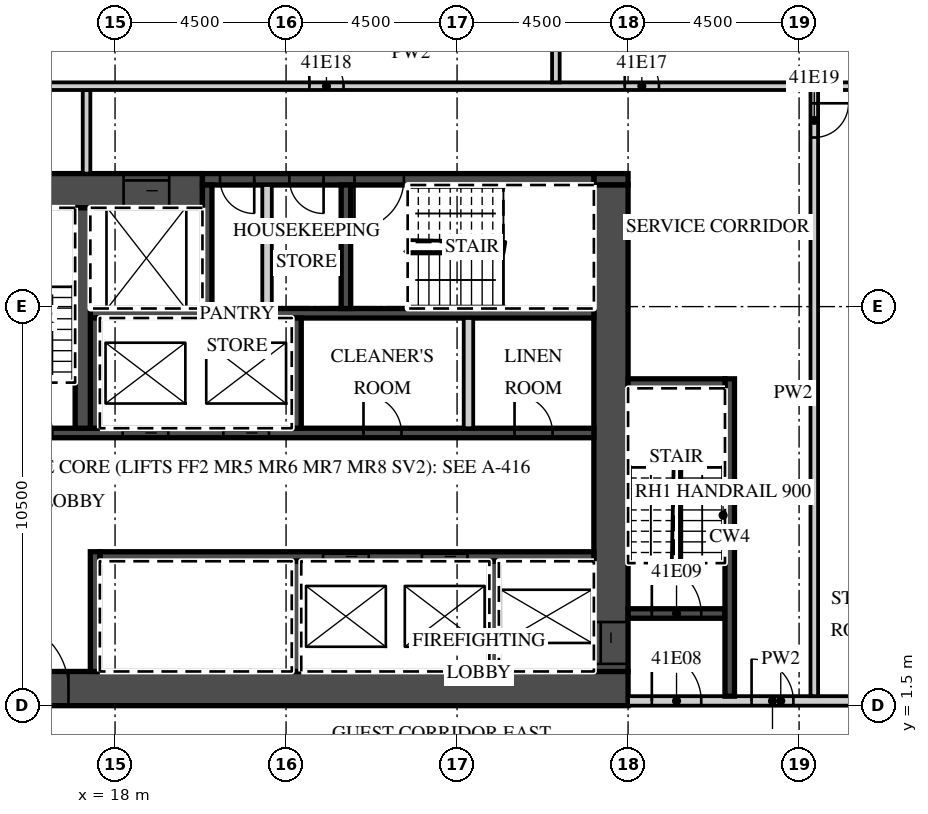
"""IFC4 building model, lengths in metres.
Left out: names, types, materials, properties, quantities, classifications, styles, units other than length and angle.
Written with IfcOpenShell. Run it as: python <this file> out.ifc"""

import sys

from ifc_helpers import new_model, si_unit, direction, frame, frame_2d, origin, place, context, subcontext, project, spatial, rectangle, extrude, element, fill, save


model = new_model("IFC4")
c1 = context("Model", 3, precision=1e-05, world=origin(), true_north=direction((0.0, 1.0)))
c2 = subcontext(c1, "Body", "Model", "MODEL_VIEW")
j1 = project(units=[si_unit("LENGTHUNIT", "METRE"), si_unit("PLANEANGLEUNIT", "RADIAN")], contexts=[c1])
p1 = place(None, origin())
s1 = spatial("IfcSite", under=j1, at=p1, CompositionType="ELEMENT")
p2 = place(p1, origin())
s2 = spatial("IfcBuilding", under=s1, at=p2, CompositionType="ELEMENT")
p3 = place(p2, frame((0.0, 0.0, 176.8)))
s3 = spatial("IfcBuildingStorey", under=s2, at=p3, CompositionType="ELEMENT", Elevation=176.8)
p4 = place(p3, frame((13.5, 1.95, 0.0), z_axis=(0.0, 0.0, 1.0), x_axis=(1.0, 0.0, 0.0)))
e1 = element("IfcWall", 1, at=p4, inside=s3, PredefinedType="SHEAR", context=c2, shape_type="SweptSolid", body=[
    extrude(rectangle(XDim=18.0, YDim=0.9, at=frame_2d((9.0, 0.0))), origin(), (0.0, 0.0, 1.0), 3.02),
])
p5 = place(p4, frame((1.475, 0.0, 0.0)))
e2 = element("IfcOpeningElement", 2, at=p5, cuts=e1, PredefinedType="OPENING", context=c2, shape_type="SweptSolid", body=[
    extrude(rectangle(XDim=1.8, YDim=2.1, at=frame_2d((0.9, 1.05))), frame((0.0, 0.46, 0.0), z_axis=(0.0, -1.0, 0.0), x_axis=(1.0, 0.0, 0.0)), (0.0, 0.0, 1.0), 0.92),
])
p6 = place(p3, frame((13.5, 15.05, 0.0), z_axis=(0.0, 0.0, 1.0), x_axis=(1.0, 0.0, 0.0)))
e3 = element("IfcWall", 3, at=p6, inside=s3, PredefinedType="SHEAR", context=c2, shape_type="SweptSolid", body=[
    extrude(rectangle(XDim=6.8, YDim=0.9, at=frame_2d((3.4, 0.0))), origin(), (0.0, 0.0, 1.0), 3.02),
])
p7 = place(p6, frame((4.725, 0.0, 0.0)))
e4 = element("IfcOpeningElement", 4, at=p7, cuts=e3, PredefinedType="OPENING", context=c2, shape_type="SweptSolid", body=[
    extrude(rectangle(XDim=1.2, YDim=2.1, at=frame_2d((0.6, 1.05))), frame((0.0, 0.46, 0.0), z_axis=(0.0, -1.0, 0.0), x_axis=(1.0, 0.0, 0.0)), (0.0, 0.0, 1.0), 0.92),
])
p8 = place(p3, frame((30.6, 15.35, 0.0), z_axis=(0.0, 0.0, 1.0), x_axis=(1.0, 0.0, 0.0)))
e5 = element("IfcWall", 5, at=p8, inside=s3, PredefinedType="SHEAR", context=c2, shape_type="SweptSolid", body=[
    extrude(rectangle(XDim=0.9, YDim=0.3, at=frame_2d((0.45, 0.0))), origin(), (0.0, 0.0, 1.0), 3.02),
])
p9 = place(p3, frame((20.3, 15.35, 0.0), z_axis=(0.0, 0.0, 1.0), x_axis=(1.0, 0.0, 0.0)))
e6 = element("IfcWall", 6, at=p9, inside=s3, PredefinedType="SHEAR", context=c2, shape_type="SweptSolid", body=[
    extrude(rectangle(XDim=10.3, YDim=0.3, at=frame_2d((5.15, 0.0))), origin(), (0.0, 0.0, 1.0), 3.02),
])
p10 = place(p9, frame((4.0, 0.0, 0.0)))
e7 = element("IfcOpeningElement", 7, at=p10, cuts=e6, PredefinedType="OPENING", context=c2, shape_type="SweptSolid", body=[
    extrude(rectangle(XDim=1.3, YDim=2.1, at=frame_2d((0.65, 1.05))), frame((0.0, 0.16, 0.0), z_axis=(0.0, -1.0, 0.0), x_axis=(1.0, 0.0, 0.0)), (0.0, 0.0, 1.0), 0.32),
])
p11 = place(p9, frame((2.288, 0.0, 0.0)))
e8 = element("IfcOpeningElement", 8, at=p11, cuts=e6, PredefinedType="OPENING", context=c2, shape_type="SweptSolid", body=[
    extrude(rectangle(XDim=0.9, YDim=2.1, at=frame_2d((0.45, 1.05))), frame((0.0, 0.16, 0.0), z_axis=(0.0, -1.0, 0.0), x_axis=(1.0, 0.0, 0.0)), (0.0, 0.0, 1.0), 0.32),
])
p12 = place(p9, frame((0.462, 0.0, 0.0)))
e9 = element("IfcOpeningElement", 9, at=p12, cuts=e6, PredefinedType="OPENING", context=c2, shape_type="SweptSolid", body=[
    extrude(rectangle(XDim=0.9, YDim=2.1, at=frame_2d((0.45, 1.05))), frame((0.0, 0.16, 0.0), z_axis=(0.0, -1.0, 0.0), x_axis=(1.0, 0.0, 0.0)), (0.0, 0.0, 1.0), 0.32),
])
p13 = place(p3, frame((31.05, 2.4, 0.0), z_axis=(0.0, 0.0, 1.0), x_axis=(0.0, 1.0, 0.0)))
e10 = element("IfcWall", 10, at=p13, inside=s3, PredefinedType="SHEAR", context=c2, shape_type="SweptSolid", body=[
    extrude(rectangle(XDim=12.8, YDim=0.9, at=frame_2d((6.4, 0.0))), origin(), (0.0, 0.0, 1.0), 3.02),
])
p14 = place(p13, frame((0.2, 0.0, 0.0)))
e11 = element("IfcOpeningElement", 11, at=p14, cuts=e10, PredefinedType="OPENING", context=c2, shape_type="SweptSolid", body=[
    extrude(rectangle(XDim=1.1, YDim=2.1, at=frame_2d((0.55, 1.05))), frame((0.0, 0.46, 0.0), z_axis=(0.0, -1.0, 0.0), x_axis=(1.0, 0.0, 0.0)), (0.0, 0.0, 1.0), 0.92),
])
p15 = place(p3, frame((17.6, 5.425, 0.0), z_axis=(0.0, 0.0, 1.0), x_axis=(1.0, 0.0, 0.0)))
e12 = element("IfcWall", 12, at=p15, inside=s3, PredefinedType="SHEAR", context=c2, shape_type="SweptSolid", body=[
    extrude(rectangle(XDim=13.0, YDim=0.25, at=frame_2d((6.5, 0.0))), origin(), (0.0, 0.0, 1.0), 3.02),
])
p16 = place(p15, frame((8.475, 0.0, 0.0)))
e13 = element("IfcOpeningElement", 13, at=p16, cuts=e12, PredefinedType="OPENING", context=c2, shape_type="SweptSolid", body=[
    extrude(rectangle(XDim=1.2, YDim=2.1, at=frame_2d((0.6, 1.05))), frame((0.0, 0.135, 0.0), z_axis=(0.0, -1.0, 0.0), x_axis=(1.0, 0.0, 0.0)), (0.0, 0.0, 1.0), 0.27),
])
p17 = place(p15, frame((5.875, 0.0, 0.0)))
e14 = element("IfcOpeningElement", 14, at=p17, cuts=e12, PredefinedType="OPENING", context=c2, shape_type="SweptSolid", body=[
    extrude(rectangle(XDim=1.2, YDim=2.1, at=frame_2d((0.6, 1.05))), frame((0.0, 0.135, 0.0), z_axis=(0.0, -1.0, 0.0), x_axis=(1.0, 0.0, 0.0)), (0.0, 0.0, 1.0), 0.27),
])
p18 = place(p3, frame((17.475, 2.4, 0.0), z_axis=(0.0, 0.0, 1.0), x_axis=(0.0, 1.0, 0.0)))
e15 = element("IfcWall", 15, at=p18, inside=s3, PredefinedType="SHEAR", context=c2, shape_type="SweptSolid", body=[
    extrude(rectangle(XDim=3.15, YDim=0.25, at=frame_2d((1.575, 0.0))), origin(), (0.0, 0.0, 1.0), 3.02),
])
for number, where, z_axis, x_axis in (
    (16, (27.975, 2.4, 0.0), (0.0, 0.0, 1.0), (0.0, 1.0, 0.0)),
    (17, (22.775, 2.4, 0.0), (0.0, 0.0, 1.0), (0.0, 1.0, 0.0)),
):
    element("IfcWall", number, at=place(p3, frame(where, z_axis=z_axis, x_axis=x_axis)), inside=s3, PredefinedType="SHEAR", context=c2, shape_type="SweptSolid", body=[
        extrude(rectangle(XDim=2.9, YDim=0.25, at=frame_2d((1.45, 0.0))), origin(), (0.0, 0.0, 1.0), 3.02),
    ])
p19 = place(p3, frame((14.4, 8.675, 0.0), z_axis=(0.0, 0.0, 1.0), x_axis=(1.0, 0.0, 0.0)))
e18 = element("IfcWall", 18, at=p19, inside=s3, PredefinedType="SHEAR", context=c2, shape_type="SweptSolid", body=[
    extrude(rectangle(XDim=16.2, YDim=0.25, at=frame_2d((8.1, 0.0))), origin(), (0.0, 0.0, 1.0), 3.02),
])
p20 = place(p19, frame((6.45, 0.0, 0.0)))
e19 = element("IfcOpeningElement", 19, at=p20, cuts=e18, PredefinedType="OPENING", context=c2, shape_type="SweptSolid", body=[
    extrude(rectangle(XDim=1.2, YDim=2.1, at=frame_2d((0.6, 1.05))), frame((0.0, 0.135, 0.0), z_axis=(0.0, -1.0, 0.0), x_axis=(1.0, 0.0, 0.0)), (0.0, 0.0, 1.0), 0.27),
])
p21 = place(p19, frame((3.8, 0.0, 0.0)))
e20 = element("IfcOpeningElement", 20, at=p21, cuts=e18, PredefinedType="OPENING", context=c2, shape_type="SweptSolid", body=[
    extrude(rectangle(XDim=1.2, YDim=2.1, at=frame_2d((0.6, 1.05))), frame((0.0, 0.135, 0.0), z_axis=(0.0, -1.0, 0.0), x_axis=(1.0, 0.0, 0.0)), (0.0, 0.0, 1.0), 0.27),
])
p22 = place(p19, frame((0.65, 0.0, 0.0)))
e21 = element("IfcOpeningElement", 21, at=p22, cuts=e18, PredefinedType="OPENING", context=c2, shape_type="SweptSolid", body=[
    extrude(rectangle(XDim=1.3, YDim=2.1, at=frame_2d((0.65, 1.05))), frame((0.0, 0.135, 0.0), z_axis=(0.0, -1.0, 0.0), x_axis=(1.0, 0.0, 0.0)), (0.0, 0.0, 1.0), 0.27),
])
p23 = place(p19, frame((14.113, 0.0, 0.0)))
e22 = element("IfcOpeningElement", 22, at=p23, cuts=e18, PredefinedType="OPENING", context=c2, shape_type="SweptSolid", body=[
    extrude(rectangle(XDim=1.0, YDim=2.1, at=frame_2d((0.5, 1.05))), frame((0.0, 0.135, 0.0), z_axis=(0.0, -1.0, 0.0), x_axis=(1.0, 0.0, 0.0)), (0.0, 0.0, 1.0), 0.27),
])
p24 = place(p19, frame((10.137, 0.0, 0.0)))
e23 = element("IfcOpeningElement", 23, at=p24, cuts=e18, PredefinedType="OPENING", context=c2, shape_type="SweptSolid", body=[
    extrude(rectangle(XDim=1.0, YDim=2.1, at=frame_2d((0.5, 1.05))), frame((0.0, 0.135, 0.0), z_axis=(0.0, -1.0, 0.0), x_axis=(1.0, 0.0, 0.0)), (0.0, 0.0, 1.0), 0.27),
])
p25 = place(p3, frame((17.35, 11.825, 0.0), z_axis=(0.0, 0.0, 1.0), x_axis=(1.0, 0.0, 0.0)))
e24 = element("IfcWall", 24, at=p25, inside=s3, PredefinedType="SHEAR", context=c2, shape_type="SweptSolid", body=[
    extrude(rectangle(XDim=13.25, YDim=0.25, at=frame_2d((6.625, 0.0))), origin(), (0.0, 0.0, 1.0), 3.02),
])
for number, where, z_axis, x_axis in (
    (25, (17.475, 8.8, 0.0), (0.0, 0.0, 1.0), (0.0, 1.0, 0.0)),
    (26, (22.775, 8.8, 0.0), (0.0, 0.0, 1.0), (0.0, 1.0, 0.0)),
):
    element("IfcWall", number, at=place(p3, frame(where, z_axis=z_axis, x_axis=x_axis)), inside=s3, PredefinedType="SHEAR", context=c2, shape_type="SweptSolid", body=[
        extrude(rectangle(XDim=2.9, YDim=0.25, at=frame_2d((1.45, 0.0))), origin(), (0.0, 0.0, 1.0), 3.02),
    ])
p26 = place(p3, frame((27.3, 8.8, 0.0), z_axis=(0.0, 0.0, 1.0), x_axis=(0.0, 1.0, 0.0)))
e27 = element("IfcWall", 27, at=p26, inside=s3, PredefinedType="PARTITIONING", context=c2, shape_type="SweptSolid", body=[
    extrude(rectangle(XDim=2.9, YDim=0.25, at=frame_2d((1.45, 0.0))), origin(), (0.0, 0.0, 1.0), 3.02),
])
p27 = place(p3, frame((17.15, 8.8, 0.0), z_axis=(0.0, 0.0, 1.0), x_axis=(0.0, 1.0, 0.0)))
e28 = element("IfcWall", 28, at=p27, inside=s3, PredefinedType="SHEAR", context=c2, shape_type="SweptSolid", body=[
    extrude(rectangle(XDim=5.8, YDim=0.4, at=frame_2d((2.9, 0.0))), origin(), (0.0, 0.0, 1.0), 3.02),
])
for number, where, z_axis, x_axis in (
    (29, (20.425, 11.95, 0.0), (0.0, 0.0, 1.0), (0.0, 1.0, 0.0)),
    (30, (24.075, 11.95, 0.0), (0.0, 0.0, 1.0), (0.0, 1.0, 0.0)),
):
    element("IfcWall", number, at=place(p3, frame(where, z_axis=z_axis, x_axis=x_axis)), inside=s3, PredefinedType="SHEAR", context=c2, shape_type="SweptSolid", body=[
        extrude(rectangle(XDim=3.25, YDim=0.25, at=frame_2d((1.625, 0.0))), origin(), (0.0, 0.0, 1.0), 3.02),
    ])
p28 = place(p3, frame((22.0, 11.95, 0.0), z_axis=(0.0, 0.0, 1.0), x_axis=(0.0, 1.0, 0.0)))
e31 = element("IfcWall", 31, at=p28, inside=s3, PredefinedType="PARTITIONING", context=c2, shape_type="SweptSolid", body=[
    extrude(rectangle(XDim=3.25, YDim=0.25, at=frame_2d((1.625, 0.0))), origin(), (0.0, 0.0, 1.0), 3.02),
])
p29 = place(p3, frame((31.5, 1.625, 0.0), z_axis=(0.0, 0.0, 1.0), x_axis=(1.0, 0.0, 0.0)))
e32 = element("IfcWall", 32, at=p29, inside=s3, PredefinedType="PARTITIONING", context=c2, shape_type="SweptSolid", body=[
    extrude(rectangle(XDim=8.035, YDim=0.25, at=frame_2d((4.018, 0.0))), origin(), (0.0, 0.0, 1.0), 3.02),
])
p30 = place(p29, frame((0.625, 0.0, 0.0)))
e33 = element("IfcOpeningElement", 33, at=p30, cuts=e32, PredefinedType="OPENING", context=c2, shape_type="SweptSolid", body=[
    extrude(rectangle(XDim=1.3, YDim=2.1, at=frame_2d((0.65, 1.05))), frame((0.0, 0.135, 0.0), z_axis=(0.0, -1.0, 0.0), x_axis=(1.0, 0.0, 0.0)), (0.0, 0.0, 1.0), 0.27),
])
p31 = place(p29, frame((3.25, 0.0, 0.0)))
e34 = element("IfcOpeningElement", 34, at=p31, cuts=e32, PredefinedType="OPENING", context=c2, shape_type="SweptSolid", body=[
    extrude(rectangle(XDim=1.1, YDim=2.1, at=frame_2d((0.55, 1.05))), frame((0.0, 0.135, 0.0), z_axis=(0.0, -1.0, 0.0), x_axis=(1.0, 0.0, 0.0)), (0.0, 0.0, 1.0), 0.27),
])
p32 = place(p3, frame((31.5, 3.925, 0.0), z_axis=(0.0, 0.0, 1.0), x_axis=(1.0, 0.0, 0.0)))
e35 = element("IfcWall", 35, at=p32, inside=s3, PredefinedType="SHEAR", context=c2, shape_type="SweptSolid", body=[
    extrude(rectangle(XDim=2.55, YDim=0.25, at=frame_2d((1.275, 0.0))), origin(), (0.0, 0.0, 1.0), 3.02),
])
p33 = place(p32, frame((0.625, 0.0, 0.0)))
e36 = element("IfcOpeningElement", 36, at=p33, cuts=e35, PredefinedType="OPENING", context=c2, shape_type="SweptSolid", body=[
    extrude(rectangle(XDim=1.3, YDim=2.1, at=frame_2d((0.65, 1.05))), frame((0.0, 0.135, 0.0), z_axis=(0.0, -1.0, 0.0), x_axis=(1.0, 0.0, 0.0)), (0.0, 0.0, 1.0), 0.27),
])
p34 = place(p3, frame((34.175, 1.75, 0.0), z_axis=(0.0, 0.0, 1.0), x_axis=(0.0, 1.0, 0.0)))
e37 = element("IfcWall", 37, at=p34, inside=s3, PredefinedType="SHEAR", context=c2, shape_type="SweptSolid", body=[
    extrude(rectangle(XDim=8.35, YDim=0.25, at=frame_2d((4.175, 0.0))), origin(), (0.0, 0.0, 1.0), 3.02),
])
p35 = place(p3, frame((31.5, 9.975, 0.0), z_axis=(0.0, 0.0, 1.0), x_axis=(1.0, 0.0, 0.0)))
e38 = element("IfcWall", 38, at=p35, inside=s3, PredefinedType="SHEAR", context=c2, shape_type="SweptSolid", body=[
    extrude(rectangle(XDim=2.55, YDim=0.25, at=frame_2d((1.275, 0.0))), origin(), (0.0, 0.0, 1.0), 3.02),
])
p36 = place(p3, frame((17.25, 15.5, 0.0), z_axis=(0.0, 0.0, 1.0), x_axis=(0.0, 1.0, 0.0)))
e39 = element("IfcWall", 39, at=p36, inside=s3, PredefinedType="PARTITIONING", context=c2, shape_type="SweptSolid", body=[
    extrude(rectangle(XDim=2.2, YDim=0.2, at=frame_2d((1.1, 0.0))), origin(), (0.0, 0.0, 1.0), 3.02),
])
p37 = place(p3, frame((36.4, 1.75, 0.0), z_axis=(0.0, 0.0, 1.0), x_axis=(0.0, 1.0, 0.0)))
e40 = element("IfcWall", 40, at=p37, inside=s3, PredefinedType="PARTITIONING", context=c2, shape_type="SweptSolid", body=[
    extrude(rectangle(XDim=15.95, YDim=0.2, at=frame_2d((7.975, 0.0))), origin(), (0.0, 0.0, 1.0), 3.02),
])
p38 = place(p37, frame((14.7, 0.0, 0.0)))
e41 = element("IfcOpeningElement", 41, at=p38, cuts=e40, PredefinedType="OPENING", context=c2, shape_type="SweptSolid", body=[
    extrude(rectangle(XDim=0.9, YDim=2.1, at=frame_2d((0.45, 1.05))), frame((0.0, 0.11, 0.0), z_axis=(0.0, -1.0, 0.0), x_axis=(1.0, 0.0, 0.0)), (0.0, 0.0, 1.0), 0.22),
])
p39 = place(p3, frame((13.6, 17.8, 0.0), z_axis=(0.0, 0.0, 1.0), x_axis=(1.0, 0.0, 0.0)))
e42 = element("IfcWall", 42, at=p39, inside=s3, PredefinedType="PARTITIONING", context=c2, shape_type="SweptSolid", body=[
    extrude(rectangle(XDim=24.378, YDim=0.2, at=frame_2d((12.189, 0.0))), origin(), (0.0, 0.0, 1.0), 3.02),
])
p40 = place(p39, frame((17.812, 0.0, 0.0)))
e43 = element("IfcOpeningElement", 43, at=p40, cuts=e42, PredefinedType="OPENING", context=c2, shape_type="SweptSolid", body=[
    extrude(rectangle(XDim=0.9, YDim=2.1, at=frame_2d((0.45, 1.05))), frame((0.0, 0.11, 0.0), z_axis=(0.0, -1.0, 0.0), x_axis=(1.0, 0.0, 0.0)), (0.0, 0.0, 1.0), 0.22),
])
p41 = place(p39, frame((9.512, 0.0, 0.0)))
e44 = element("IfcOpeningElement", 44, at=p41, cuts=e42, PredefinedType="OPENING", context=c2, shape_type="SweptSolid", body=[
    extrude(rectangle(XDim=0.9, YDim=2.1, at=frame_2d((0.45, 1.05))), frame((0.0, 0.11, 0.0), z_axis=(0.0, -1.0, 0.0), x_axis=(1.0, 0.0, 0.0)), (0.0, 0.0, 1.0), 0.22),
])
p42 = place(p3, frame((29.6, 17.9, 0.0), z_axis=(0.0, 0.0, 1.0), x_axis=(0.0, 1.0, 0.0)))
e45 = element("IfcWall", 45, at=p42, inside=s3, PredefinedType="PARTITIONING", context=c2, shape_type="SweptSolid", body=[
    extrude(rectangle(XDim=5.241, YDim=0.2, at=frame_2d((2.62, 0.0))), origin(), (0.0, 0.0, 1.0), 3.02),
])
p43 = place(p20, origin())
e46 = element("IfcDoor", 46, at=p43, inside=s3, OperationType="SLIDING_TO_LEFT", PredefinedType="DOOR", context=c2, shape_type="SweptSolid", body=[
    extrude(rectangle(XDim=1.2, YDim=2.1, at=frame_2d((0.6, 1.05))), frame((0.0, 0.025, 0.0), z_axis=(0.0, -1.0, 0.0), x_axis=(1.0, 0.0, 0.0)), (0.0, 0.0, 1.0), 0.05),
])
fill(e19, e46)
p44 = place(p21, origin())
e47 = element("IfcDoor", 47, at=p44, inside=s3, OperationType="SLIDING_TO_RIGHT", PredefinedType="DOOR", context=c2, shape_type="SweptSolid", body=[
    extrude(rectangle(XDim=1.2, YDim=2.1, at=frame_2d((0.6, 1.05))), frame((0.0, 0.025, 0.0), z_axis=(0.0, -1.0, 0.0), x_axis=(1.0, 0.0, 0.0)), (0.0, 0.0, 1.0), 0.05),
])
fill(e20, e47)
p45 = place(p16, origin())
e48 = element("IfcDoor", 48, at=p45, inside=s3, OperationType="SLIDING_TO_LEFT", PredefinedType="DOOR", context=c2, shape_type="SweptSolid", body=[
    extrude(rectangle(XDim=1.2, YDim=2.1, at=frame_2d((0.6, 1.05))), frame((0.0, 0.025, 0.0), z_axis=(0.0, -1.0, 0.0), x_axis=(1.0, 0.0, 0.0)), (0.0, 0.0, 1.0), 0.05),
])
fill(e13, e48)
p46 = place(p17, origin())
e49 = element("IfcDoor", 49, at=p46, inside=s3, OperationType="SLIDING_TO_RIGHT", PredefinedType="DOOR", context=c2, shape_type="SweptSolid", body=[
    extrude(rectangle(XDim=1.2, YDim=2.1, at=frame_2d((0.6, 1.05))), frame((0.0, 0.025, 0.0), z_axis=(0.0, -1.0, 0.0), x_axis=(1.0, 0.0, 0.0)), (0.0, 0.0, 1.0), 0.05),
])
fill(e14, e49)
p47 = place(p7, origin())
e50 = element("IfcDoor", 50, at=p47, inside=s3, OperationType="SLIDING_TO_LEFT", PredefinedType="DOOR", context=c2, shape_type="SweptSolid", body=[
    extrude(rectangle(XDim=1.2, YDim=2.1, at=frame_2d((0.6, 1.05))), frame((0.0, 0.025, 0.0), z_axis=(0.0, -1.0, 0.0), x_axis=(1.0, 0.0, 0.0)), (0.0, 0.0, 1.0), 0.05),
])
fill(e4, e50)
p48 = place(p14, origin())
e51 = element("IfcDoor", 51, at=p48, inside=s3, OperationType="SLIDING_TO_LEFT", PredefinedType="DOOR", context=c2, shape_type="SweptSolid", body=[
    extrude(rectangle(XDim=1.1, YDim=2.1, at=frame_2d((0.55, 1.05))), frame((0.0, 0.025, 0.0), z_axis=(0.0, -1.0, 0.0), x_axis=(1.0, 0.0, 0.0)), (0.0, 0.0, 1.0), 0.05),
])
fill(e11, e51)
p49 = place(p5, origin())
e52 = element("IfcDoor", 52, at=p49, inside=s3, OperationType="DOUBLE_DOOR_DOUBLE_SWING", PredefinedType="DOOR", context=c2, shape_type="SweptSolid", body=[
    extrude(rectangle(XDim=1.8, YDim=2.1, at=frame_2d((0.9, 1.05))), frame((0.0, 0.025, 0.0), z_axis=(0.0, -1.0, 0.0), x_axis=(1.0, 0.0, 0.0)), (0.0, 0.0, 1.0), 0.05),
])
fill(e2, e52)
p50 = place(p30, origin())
e53 = element("IfcDoor", 53, at=p50, inside=s3, OperationType="SINGLE_SWING_LEFT", PredefinedType="DOOR", context=c2, shape_type="SweptSolid", body=[
    extrude(rectangle(XDim=1.3, YDim=2.1, at=frame_2d((0.65, 1.05))), frame((0.0, 0.025, 0.0), z_axis=(0.0, -1.0, 0.0), x_axis=(1.0, 0.0, 0.0)), (0.0, 0.0, 1.0), 0.05),
])
fill(e33, e53)
p51 = place(p33, origin())
e54 = element("IfcDoor", 54, at=p51, inside=s3, OperationType="SINGLE_SWING_LEFT", PredefinedType="DOOR", context=c2, shape_type="SweptSolid", body=[
    extrude(rectangle(XDim=1.3, YDim=2.1, at=frame_2d((0.65, 1.05))), frame((0.0, 0.025, 0.0), z_axis=(0.0, -1.0, 0.0), x_axis=(1.0, 0.0, 0.0)), (0.0, 0.0, 1.0), 0.05),
])
fill(e36, e54)
p52 = place(p31, origin())
e55 = element("IfcDoor", 55, at=p52, inside=s3, OperationType="SINGLE_SWING_LEFT", PredefinedType="DOOR", context=c2, shape_type="SweptSolid", body=[
    extrude(rectangle(XDim=1.1, YDim=2.1, at=frame_2d((0.55, 1.05))), frame((0.0, 0.025, 0.0), z_axis=(0.0, -1.0, 0.0), x_axis=(1.0, 0.0, 0.0)), (0.0, 0.0, 1.0), 0.05),
])
fill(e34, e55)
p53 = place(p10, origin())
e56 = element("IfcDoor", 56, at=p53, inside=s3, OperationType="SINGLE_SWING_LEFT", PredefinedType="DOOR", context=c2, shape_type="SweptSolid", body=[
    extrude(rectangle(XDim=1.3, YDim=2.1, at=frame_2d((0.65, 1.05))), frame((0.0, 0.025, 0.0), z_axis=(0.0, -1.0, 0.0), x_axis=(1.0, 0.0, 0.0)), (0.0, 0.0, 1.0), 0.05),
])
fill(e7, e56)
p54 = place(p11, origin())
e57 = element("IfcDoor", 57, at=p54, inside=s3, OperationType="SINGLE_SWING_RIGHT", PredefinedType="DOOR", context=c2, shape_type="SweptSolid", body=[
    extrude(rectangle(XDim=0.9, YDim=2.1, at=frame_2d((0.45, 1.05))), frame((0.0, 0.025, 0.0), z_axis=(0.0, -1.0, 0.0), x_axis=(1.0, 0.0, 0.0)), (0.0, 0.0, 1.0), 0.05),
])
fill(e8, e57)
p55 = place(p12, origin())
e58 = element("IfcDoor", 58, at=p55, inside=s3, OperationType="SINGLE_SWING_RIGHT", PredefinedType="DOOR", context=c2, shape_type="SweptSolid", body=[
    extrude(rectangle(XDim=0.9, YDim=2.1, at=frame_2d((0.45, 1.05))), frame((0.0, 0.025, 0.0), z_axis=(0.0, -1.0, 0.0), x_axis=(1.0, 0.0, 0.0)), (0.0, 0.0, 1.0), 0.05),
])
fill(e9, e58)
p56 = place(p23, origin())
e59 = element("IfcDoor", 59, at=p56, inside=s3, OperationType="SINGLE_SWING_LEFT", PredefinedType="DOOR", context=c2, shape_type="SweptSolid", body=[
    extrude(rectangle(XDim=1.0, YDim=2.1, at=frame_2d((0.5, 1.05))), frame((0.0, 0.025, 0.0), z_axis=(0.0, -1.0, 0.0), x_axis=(1.0, 0.0, 0.0)), (0.0, 0.0, 1.0), 0.05),
])
fill(e22, e59)
p57 = place(p24, origin())
e60 = element("IfcDoor", 60, at=p57, inside=s3, OperationType="SINGLE_SWING_LEFT", PredefinedType="DOOR", context=c2, shape_type="SweptSolid", body=[
    extrude(rectangle(XDim=1.0, YDim=2.1, at=frame_2d((0.5, 1.05))), frame((0.0, 0.025, 0.0), z_axis=(0.0, -1.0, 0.0), x_axis=(1.0, 0.0, 0.0)), (0.0, 0.0, 1.0), 0.05),
])
fill(e23, e60)
p58 = place(p40, origin())
e61 = element("IfcDoor", 61, at=p58, inside=s3, OperationType="SINGLE_SWING_LEFT", PredefinedType="DOOR", context=c2, shape_type="SweptSolid", body=[
    extrude(rectangle(XDim=0.9, YDim=2.1, at=frame_2d((0.45, 1.05))), frame((0.0, 0.025, 0.0), z_axis=(0.0, -1.0, 0.0), x_axis=(1.0, 0.0, 0.0)), (0.0, 0.0, 1.0), 0.05),
])
fill(e43, e61)
p59 = place(p41, origin())
e62 = element("IfcDoor", 62, at=p59, inside=s3, OperationType="SINGLE_SWING_LEFT", PredefinedType="DOOR", context=c2, shape_type="SweptSolid", body=[
    extrude(rectangle(XDim=0.9, YDim=2.1, at=frame_2d((0.45, 1.05))), frame((0.0, 0.025, 0.0), z_axis=(0.0, -1.0, 0.0), x_axis=(1.0, 0.0, 0.0)), (0.0, 0.0, 1.0), 0.05),
])
fill(e44, e62)
p60 = place(p38, origin())
e63 = element("IfcDoor", 63, at=p60, inside=s3, OperationType="SINGLE_SWING_RIGHT", PredefinedType="DOOR", context=c2, shape_type="SweptSolid", body=[
    extrude(rectangle(XDim=0.9, YDim=2.1, at=frame_2d((0.45, 1.05))), frame((0.0, 0.025, 0.0), z_axis=(0.0, -1.0, 0.0), x_axis=(1.0, 0.0, 0.0)), (0.0, 0.0, 1.0), 0.05),
])
fill(e41, e63)
save(model, sys.argv[1])
